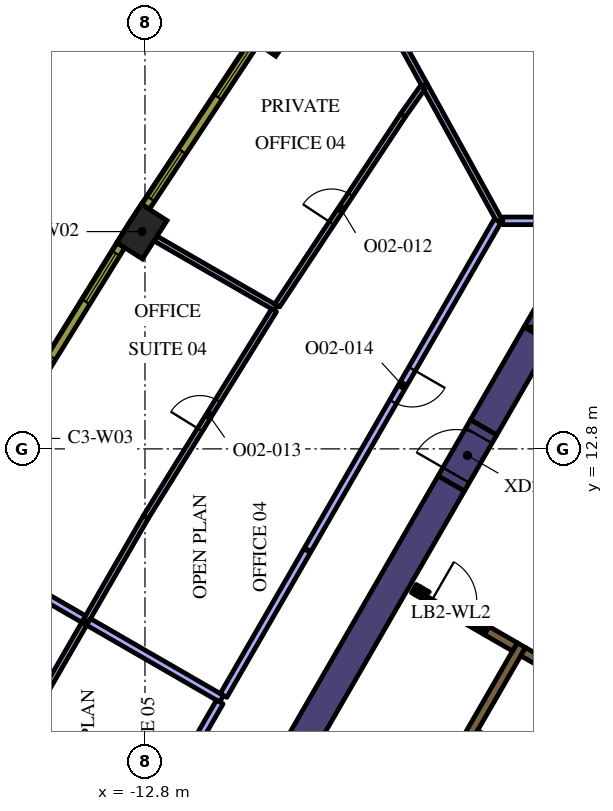
"""IFC4 building model, lengths in metres.
Left out: names, types, materials, properties, quantities, classifications, styles, units other than length and angle.
Written with IfcOpenShell. Run it as: python <this file> out.ifc"""

import sys

from ifc_helpers import new_model, si_unit, direction, frame, frame_2d, origin, origin_2d, place, context, subcontext, project, spatial, polyline, rectangle, outline, extrude, element, fill, save


model = new_model("IFC4")
c1 = context("Model", 3, precision=1e-05, world=origin(), true_north=direction((0.0, 1.0)))
c2 = subcontext(c1, "Body", "Model", "MODEL_VIEW")
j1 = project(units=[si_unit("LENGTHUNIT", "METRE"), si_unit("PLANEANGLEUNIT", "RADIAN")], contexts=[c1])
p1 = place(None, origin())
s1 = spatial("IfcSite", under=j1, at=p1, CompositionType="ELEMENT")
p2 = place(p1, origin())
s2 = spatial("IfcBuilding", under=s1, at=p2, CompositionType="ELEMENT")
p3 = place(p2, frame((0.0, 0.0, 154.2)))
s3 = spatial("IfcBuildingStorey", under=s2, at=p3, CompositionType="ELEMENT", Elevation=154.2)
for number, where, z_axis, x_axis in (
    (1, (-9.348, 23.854, 0.0), (0.0, 0.0, 1.0), (-0.565, -0.825, 0.0)),
    (2, (-12.88, 18.517, 0.0), (0.0, 0.0, 1.0), (-0.539, -0.842, 0.0)),
):
    element("IfcColumn", number, at=place(p3, frame(where, z_axis=z_axis, x_axis=x_axis)), inside=s3, PredefinedType="COLUMN", context=c2, shape_type="SweptSolid", body=[
        extrude(rectangle(XDim=1.2, YDim=0.8, at=origin_2d()), origin(), (0.0, 0.0, 1.0), 4.2),
    ])
p4 = place(p3, origin())
e3 = element("IfcWall", 3, at=p4, inside=s3, PredefinedType="SOLIDWALL", context=c2, shape_type="SweptSolid", body=[
    extrude(outline(polyline([(-2.829, 16.0), (-2.381, 16.776), (-2.381, 16.0), (-2.829, 16.0)])), origin(), (0.0, 0.0, 1.0), 4.2),
])
p5 = place(p3, frame((-2.477, 15.81, 0.0), z_axis=(0.0, 0.0, 1.0), x_axis=(-0.499969377405, -0.866043083026, 0.0)))
e4 = element("IfcWall", 4, at=p5, inside=s3, PredefinedType="SOLIDWALL", context=c2, shape_type="SweptSolid", body=[
    extrude(rectangle(XDim=2.824, YDim=0.8, at=frame_2d((1.412, 0.0))), origin(), (0.0, 0.0, 1.0), 4.2),
])
e5 = element("IfcWall", 5, at=p4, inside=s3, PredefinedType="SOLIDWALL", context=c2, shape_type="SweptSolid", body=[
    extrude(outline(polyline([(-1.905, 16.0), (-2.129, 15.612), (-2.801, 16.0), (-1.905, 16.0)])), origin(), (0.0, 0.0, 1.0), 4.2),
])
p6 = place(p3, frame((-12.668, -1.842, 0.0), z_axis=(0.0, 0.0, 1.0), x_axis=(0.500003640647, 0.866023301845, 0.0)))
e6 = element("IfcWall", 6, at=p6, inside=s3, PredefinedType="SOLIDWALL", context=c2, shape_type="SweptSolid", body=[
    extrude(rectangle(XDim=15.858, YDim=0.8, at=frame_2d((7.929, 0.0))), origin(), (0.0, 0.0, 1.0), 4.2),
])
p7 = place(p3, frame((-8.06, -1.311, 0.0), z_axis=(0.0, 0.0, 1.0), x_axis=(0.50000273126, 0.866023826885, 0.0)))
e7 = element("IfcWall", 7, at=p7, inside=s3, PredefinedType="SOLIDWALL", context=c2, shape_type="SweptSolid", body=[
    extrude(rectangle(XDim=10.33, YDim=0.25, at=frame_2d((5.165, 0.0))), origin(), (0.0, 0.0, 1.0), 4.2),
])
p8 = place(p3, frame((-1.76, 6.836, 0.0), z_axis=(0.0, 0.0, 1.0), x_axis=(-0.865952863304, 0.500125622755, 0.0)))
e8 = element("IfcWall", 8, at=p8, inside=s3, PredefinedType="SOLIDWALL", context=c2, shape_type="SweptSolid", body=[
    extrude(rectangle(XDim=1.258, YDim=0.25, at=frame_2d((0.629, 0.0))), origin(), (0.0, 0.0, 1.0), 4.2),
])
p9 = place(p3, frame((-2.204, 4.182, 0.0), z_axis=(0.0, 0.0, 1.0), x_axis=(-0.866008176907, 0.50002983664, 0.0)))
e9 = element("IfcWall", 9, at=p9, inside=s3, PredefinedType="SOLIDWALL", context=c2, shape_type="SweptSolid", body=[
    extrude(rectangle(XDim=2.2, YDim=0.25, at=frame_2d((1.1, 0.0))), origin(), (0.0, 0.0, 1.0), 4.2),
])
p10 = place(p3, frame((-5.725, 9.125, 0.0), z_axis=(0.0, 0.0, 1.0), x_axis=(0.866185586049, -0.49972245349, 0.0)))
e10 = element("IfcWall", 10, at=p10, inside=s3, PredefinedType="SOLIDWALL", context=c2, shape_type="SweptSolid", body=[
    extrude(rectangle(XDim=0.11, YDim=0.25, at=frame_2d((0.055, 0.0))), origin(), (0.0, 0.0, 1.0), 4.2),
])
p11 = place(p3, frame((-3.066, 7.59, 0.0), z_axis=(0.0, 0.0, 1.0), x_axis=(-0.866081358704, 0.49990307071, 0.0)))
e11 = element("IfcWall", 11, at=p11, inside=s3, PredefinedType="SOLIDWALL", context=c2, shape_type="SweptSolid", body=[
    extrude(rectangle(XDim=0.858, YDim=0.25, at=frame_2d((0.429, 0.0))), origin(), (0.0, 0.0, 1.0), 4.2),
])
e12 = element("IfcWall", 12, at=p4, inside=s3, PredefinedType="SOLIDWALL", context=c2, shape_type="SweptSolid", body=[
    extrude(outline(polyline([(-3.748, 8.128), (-3.813, 8.015), (-4.027, 8.139), (-4.017, 8.156), (-4.008, 8.173), (-4.0, 8.192), (-3.995, 8.21), (-3.991, 8.23), (-3.99, 8.25), (-3.99, 8.268), (-3.748, 8.128)])), origin(), (0.0, 0.0, 1.0), 4.2),
])
e13 = element("IfcWall", 13, at=p4, inside=s3, PredefinedType="SOLIDWALL", context=c2, shape_type="SweptSolid", body=[
    extrude(outline(polyline([(-5.689, 8.96), (-5.69, 8.961), (-5.565, 9.177), (-5.319, 9.035), (-5.335, 9.026), (-5.351, 9.015), (-5.366, 9.002), (-5.379, 8.988), (-5.392, 8.972), (-5.402, 8.956), (-5.412, 8.939), (-5.629, 9.064), (-5.629, 9.064), (-5.689, 8.96)])), origin(), (0.0, 0.0, 1.0), 4.2),
])
p12 = place(p3, frame((-0.898, 6.194, 0.0), z_axis=(0.0, 0.0, 1.0), x_axis=(-0.499996202215, -0.866027596426, 0.0)))
e14 = element("IfcWall", 14, at=p12, inside=s3, PredefinedType="SOLIDWALL", context=c2, shape_type="SweptSolid", body=[
    extrude(rectangle(XDim=9.83, YDim=0.25, at=frame_2d((4.915, 0.0))), origin(), (0.0, 0.0, 1.0), 4.2),
])
p13 = place(p12, frame((0.585, 0.0, 0.0)))
e15 = element("IfcOpeningElement", 15, at=p13, cuts=e14, PredefinedType="OPENING", context=c2, shape_type="SweptSolid", body=[
    extrude(rectangle(XDim=1.1, YDim=2.1, at=frame_2d((0.55, 1.05))), frame((0.0, 0.135, 0.0), z_axis=(0.0, -1.0, 0.0), x_axis=(1.0, 0.0, 0.0)), (0.0, 0.0, 1.0), 0.27),
])
p14 = place(p12, frame((3.105, 0.0, 0.0)))
e16 = element("IfcOpeningElement", 16, at=p14, cuts=e14, PredefinedType="OPENING", context=c2, shape_type="SweptSolid", body=[
    extrude(rectangle(XDim=1.1, YDim=2.1, at=frame_2d((0.55, 1.05))), frame((0.0, 0.135, 0.0), z_axis=(0.0, -1.0, 0.0), x_axis=(1.0, 0.0, 0.0)), (0.0, 0.0, 1.0), 0.27),
])
p15 = place(p12, frame((5.625, 0.0, 0.0)))
e17 = element("IfcOpeningElement", 17, at=p15, cuts=e14, PredefinedType="OPENING", context=c2, shape_type="SweptSolid", body=[
    extrude(rectangle(XDim=1.1, YDim=2.1, at=frame_2d((0.55, 1.05))), frame((0.0, 0.135, 0.0), z_axis=(0.0, -1.0, 0.0), x_axis=(1.0, 0.0, 0.0)), (0.0, 0.0, 1.0), 0.27),
])
p16 = place(p12, frame((8.145, 0.0, 0.0)))
e18 = element("IfcOpeningElement", 18, at=p16, cuts=e14, PredefinedType="OPENING", context=c2, shape_type="SweptSolid", body=[
    extrude(rectangle(XDim=1.1, YDim=2.1, at=frame_2d((0.55, 1.05))), frame((0.0, 0.135, 0.0), z_axis=(0.0, -1.0, 0.0), x_axis=(1.0, 0.0, 0.0)), (0.0, 0.0, 1.0), 0.27),
])
p17 = place(p3, frame((-5.659, 9.012, 0.0), z_axis=(0.0, 0.0, 1.0), x_axis=(0.866009402589, -0.500027713859, 0.0)))
e19 = element("IfcWall", 19, at=p17, inside=s3, PredefinedType="PARTITIONING", context=c2, shape_type="SweptSolid", body=[
    extrude(rectangle(XDim=2.1, YDim=0.12, at=frame_2d((1.05, 0.0))), origin(), (0.0, 0.0, 1.0), 3.15),
])
p18 = place(p17, frame((0.45, 0.0, 0.0)))
e20 = element("IfcOpeningElement", 20, at=p18, cuts=e19, PredefinedType="OPENING", context=c2, shape_type="SweptSolid", body=[
    extrude(rectangle(XDim=1.2, YDim=2.1, at=frame_2d((0.6, 1.05))), frame((0.0, 0.07, 0.0), z_axis=(0.0, -1.0, 0.0), x_axis=(1.0, 0.0, 0.0)), (0.0, 0.0, 1.0), 0.14),
])
p19 = place(p3, frame((-4.739, 11.892, 0.0), z_axis=(0.0, 0.0, 1.0), x_axis=(0.500062241894, 0.865989465428, 0.0)))
e21 = element("IfcWall", 21, at=p19, inside=s3, PredefinedType="SOLIDWALL", context=c2, shape_type="SweptSolid", body=[
    extrude(rectangle(XDim=1.7, YDim=0.8, at=frame_2d((0.85, 0.0))), origin(), (0.0, 0.0, 1.0), 4.2),
])
p20 = place(p19, frame((0.25, 0.0, 0.0)))
e22 = element("IfcOpeningElement", 22, at=p20, cuts=e21, PredefinedType="OPENING", context=c2, shape_type="SweptSolid", body=[
    extrude(rectangle(XDim=1.2, YDim=2.1, at=frame_2d((0.6, 1.05))), frame((0.0, 0.41, 0.0), z_axis=(0.0, -1.0, 0.0), x_axis=(1.0, 0.0, 0.0)), (0.0, 0.0, 1.0), 0.82),
])
p21 = place(p3, frame((-5.442, 22.374, 0.0), z_axis=(0.0, 0.0, 1.0), x_axis=(-0.482987550425, 0.875627218703, 0.0)))
e23 = element("IfcWall", 23, at=p21, inside=s3, PredefinedType="PARTITIONING", context=c2, shape_type="SweptSolid", body=[
    extrude(rectangle(XDim=4.672, YDim=0.15, at=frame_2d((2.336, 0.0))), origin(), (0.0, 0.0, 1.0), 3.15),
])
p22 = place(p3, frame((-3.47, 18.8, 0.0), z_axis=(0.0, 0.0, 1.0), x_axis=(-0.482974768035, 0.875634269225, 0.0)))
e24 = element("IfcWall", 24, at=p22, inside=s3, PredefinedType="PARTITIONING", context=c2, shape_type="SweptSolid", body=[
    extrude(rectangle(XDim=4.09, YDim=0.15, at=frame_2d((2.045, 0.0))), origin(), (0.0, 0.0, 1.0), 3.15),
])
p23 = place(p3, frame((-1.23, 18.8, 0.0), z_axis=(0.0, 0.0, 1.0), x_axis=(-1.0, 0.0, 0.0)))
e25 = element("IfcWall", 25, at=p23, inside=s3, PredefinedType="PARTITIONING", context=c2, shape_type="SweptSolid", body=[
    extrude(rectangle(XDim=2.155, YDim=0.2, at=frame_2d((1.077, 0.0))), origin(), (0.0, 0.0, 1.0), 3.15),
])
p24 = place(p3, frame((-9.363, 16.511, 0.0), z_axis=(0.0, 0.0, 1.0), x_axis=(-0.866006134298, 0.500033374244, 0.0)))
e26 = element("IfcWall", 26, at=p24, inside=s3, PredefinedType="PARTITIONING", context=c2, shape_type="SweptSolid", body=[
    extrude(rectangle(XDim=3.648, YDim=0.15, at=frame_2d((1.824, 0.0))), origin(), (0.0, 0.0, 1.0), 3.15),
])
p25 = place(p3, frame((-5.492, 22.31, 0.0), z_axis=(0.0, 0.0, 1.0), x_axis=(-0.576980663571, -0.816757806124, 0.0)))
e27 = element("IfcWall", 27, at=p25, inside=s3, PredefinedType="PARTITIONING", context=c2, shape_type="SweptSolid", body=[
    extrude(rectangle(XDim=0.902, YDim=0.15, at=frame_2d((0.451, 0.0))), origin(), (0.0, 0.0, 1.0), 3.15),
])
p26 = place(p3, frame((-9.322, 16.573, 0.0), z_axis=(0.0, 0.0, 1.0), x_axis=(0.551906048292, 0.833906298009, 0.0)))
e28 = element("IfcWall", 28, at=p26, inside=s3, PredefinedType="PARTITIONING", context=c2, shape_type="SweptSolid", body=[
    extrude(rectangle(XDim=5.995, YDim=0.15, at=frame_2d((2.998, 0.0))), origin(), (0.0, 0.0, 1.0), 3.15),
])
p27 = place(p26, frame((2.595, 0.0, 0.0)))
e29 = element("IfcOpeningElement", 29, at=p27, cuts=e28, PredefinedType="OPENING", context=c2, shape_type="SweptSolid", body=[
    extrude(rectangle(XDim=0.9, YDim=2.1, at=frame_2d((0.45, 1.05))), frame((0.0, 0.085, 0.0), z_axis=(0.0, -1.0, 0.0), x_axis=(1.0, 0.0, 0.0)), (0.0, 0.0, 1.0), 0.17),
])
p28 = place(p3, frame((-12.779, 11.002, 0.0), z_axis=(0.0, 0.0, 1.0), x_axis=(0.527026092571, 0.849849102929, 0.0)))
e30 = element("IfcWall", 30, at=p28, inside=s3, PredefinedType="PARTITIONING", context=c2, shape_type="SweptSolid", body=[
    extrude(rectangle(XDim=6.407, YDim=0.15, at=frame_2d((3.204, 0.0))), origin(), (0.0, 0.0, 1.0), 3.15),
])
p29 = place(p28, frame((2.707, 0.0, 0.0)))
e31 = element("IfcOpeningElement", 31, at=p29, cuts=e30, PredefinedType="OPENING", context=c2, shape_type="SweptSolid", body=[
    extrude(rectangle(XDim=0.9, YDim=2.1, at=frame_2d((0.45, 1.05))), frame((0.0, 0.085, 0.0), z_axis=(0.0, -1.0, 0.0), x_axis=(1.0, 0.0, 0.0)), (0.0, 0.0, 1.0), 0.17),
])
p30 = place(p3, frame((-12.779, 11.002, 0.0), z_axis=(0.0, 0.0, 1.0), x_axis=(-0.499996312652, -0.866027532665, 0.0)))
e32 = element("IfcWall", 32, at=p30, inside=s3, PredefinedType="PARTITIONING", context=c2, shape_type="SweptSolid", body=[
    extrude(rectangle(XDim=3.138, YDim=0.15, at=frame_2d((1.569, 0.0))), origin(), (0.0, 0.0, 1.0), 3.15),
])
p31 = place(p3, frame((-14.413, 8.322, 0.0), z_axis=(0.0, 0.0, 1.0), x_axis=(-0.866034795751, 0.499983732284, 0.0)))
e33 = element("IfcWall", 33, at=p31, inside=s3, PredefinedType="PARTITIONING", context=c2, shape_type="SweptSolid", body=[
    extrude(rectangle(XDim=4.125, YDim=0.2, at=frame_2d((2.062, 0.0))), origin(), (0.0, 0.0, 1.0), 3.15),
])
p32 = place(p3, frame((-10.782, 6.225, 0.0), z_axis=(0.0, 0.0, 1.0), x_axis=(-0.866034752867, 0.499983806564, 0.0)))
e34 = element("IfcWall", 34, at=p32, inside=s3, PredefinedType="PARTITIONING", context=c2, shape_type="SweptSolid", body=[
    extrude(rectangle(XDim=4.043, YDim=0.2, at=frame_2d((2.021, 0.0))), origin(), (0.0, 0.0, 1.0), 3.15),
])
p33 = place(p3, frame((-8.532, 10.122, 0.0), z_axis=(0.0, 0.0, 1.0), x_axis=(-0.499988222896, -0.866032203192, 0.0)))
e35 = element("IfcWall", 35, at=p33, inside=s3, PredefinedType="PARTITIONING", context=c2, shape_type="SweptSolid", body=[
    extrude(rectangle(XDim=4.4, YDim=0.2, at=frame_2d((2.2, 0.0))), origin(), (0.0, 0.0, 1.0), 3.15),
])
p34 = place(p3, frame((-3.522, 18.8, 0.0), z_axis=(0.0, 0.0, 1.0), x_axis=(-0.500015783377, -0.866016291056, 0.0)))
e36 = element("IfcWall", 36, at=p34, inside=s3, PredefinedType="PARTITIONING", context=c2, shape_type="SweptSolid", body=[
    extrude(rectangle(XDim=9.99, YDim=0.2, at=frame_2d((4.995, 0.0))), origin(), (0.0, 0.0, 1.0), 3.15),
])
p35 = place(p34, frame((4.5, 0.0, 0.0)))
e37 = element("IfcOpeningElement", 37, at=p35, cuts=e36, PredefinedType="OPENING", context=c2, shape_type="SweptSolid", body=[
    extrude(rectangle(XDim=1.0, YDim=2.1, at=frame_2d((0.5, 1.05))), frame((0.0, 0.11, 0.0), z_axis=(0.0, -1.0, 0.0), x_axis=(1.0, 0.0, 0.0)), (0.0, 0.0, 1.0), 0.22),
])
p36 = place(p3, frame((-14.398, 8.198, 0.0), z_axis=(0.0, 0.0, 1.0), x_axis=(-0.499993740961, -0.866029017412, 0.0)))
e38 = element("IfcWall", 38, at=p36, inside=s3, PredefinedType="PARTITIONING", context=c2, shape_type="SweptSolid", body=[
    extrude(rectangle(XDim=3.038, YDim=0.15, at=frame_2d((1.519, 0.0))), origin(), (0.0, 0.0, 1.0), 3.15),
])
p37 = place(p3, frame((-10.832, 6.138, 0.0), z_axis=(0.0, 0.0, 1.0), x_axis=(-0.499988222896, -0.866032203192, 0.0)))
e39 = element("IfcWall", 39, at=p37, inside=s3, PredefinedType="PARTITIONING", context=c2, shape_type="SweptSolid", body=[
    extrude(rectangle(XDim=4.4, YDim=0.2, at=frame_2d((2.2, 0.0))), origin(), (0.0, 0.0, 1.0), 3.15),
])
p38 = place(p3, frame((-9.911, 23.51, 0.0), z_axis=(0.0, 0.0, 1.0), x_axis=(-0.551892811511, -0.833915058386, 0.0)))
e40 = element("IfcWall", 40, at=p38, inside=s3, PredefinedType="SOLIDWALL", context=c2, shape_type="SweptSolid", body=[
    extrude(rectangle(XDim=5.204, YDim=0.24, at=frame_2d((2.602, 0.0))), origin(), (0.0, 0.0, 1.0), 3.95),
])
p39 = place(p38, frame((0.248, 0.0, 0.9)))
e41 = element("IfcOpeningElement", 41, at=p39, cuts=e40, PredefinedType="OPENING", context=c2, shape_type="SweptSolid", body=[
    extrude(rectangle(XDim=1.5, YDim=2.55, at=frame_2d((0.75, 1.275))), frame((0.0, 0.13, 0.0), z_axis=(0.0, -1.0, 0.0), x_axis=(1.0, 0.0, 0.0)), (0.0, 0.0, 1.0), 0.26),
])
p40 = place(p38, frame((3.455, 0.0, 0.9)))
e42 = element("IfcOpeningElement", 42, at=p40, cuts=e40, PredefinedType="OPENING", context=c2, shape_type="SweptSolid", body=[
    extrude(rectangle(XDim=1.5, YDim=2.55, at=frame_2d((0.75, 1.275))), frame((0.0, 0.13, 0.0), z_axis=(0.0, -1.0, 0.0), x_axis=(1.0, 0.0, 0.0)), (0.0, 0.0, 1.0), 0.26),
])
p41 = place(p3, frame((-13.433, 18.156, 0.0), z_axis=(0.0, 0.0, 1.0), x_axis=(-0.526197926587, -0.850362124072, 0.0)))
e43 = element("IfcWall", 43, at=p41, inside=s3, PredefinedType="SOLIDWALL", context=c2, shape_type="SweptSolid", body=[
    extrude(rectangle(XDim=5.203, YDim=0.24, at=frame_2d((2.602, 0.0))), origin(), (0.0, 0.0, 1.0), 3.95),
])
p42 = place(p41, frame((0.248, 0.0, 0.9)))
e44 = element("IfcOpeningElement", 44, at=p42, cuts=e43, PredefinedType="OPENING", context=c2, shape_type="SweptSolid", body=[
    extrude(rectangle(XDim=1.5, YDim=2.55, at=frame_2d((0.75, 1.275))), frame((0.0, 0.13, 0.0), z_axis=(0.0, -1.0, 0.0), x_axis=(1.0, 0.0, 0.0)), (0.0, 0.0, 1.0), 0.26),
])
p43 = place(p41, frame((3.455, 0.0, 0.9)))
e45 = element("IfcOpeningElement", 45, at=p43, cuts=e43, PredefinedType="OPENING", context=c2, shape_type="SweptSolid", body=[
    extrude(rectangle(XDim=1.5, YDim=2.55, at=frame_2d((0.75, 1.275))), frame((0.0, 0.13, 0.0), z_axis=(0.0, -1.0, 0.0), x_axis=(1.0, 0.0, 0.0)), (0.0, 0.0, 1.0), 0.26),
])
p44 = place(p18, origin())
e46 = element("IfcDoor", 46, at=p44, inside=s3, OperationType="SINGLE_SWING_LEFT", PredefinedType="DOOR", context=c2, shape_type="SweptSolid", body=[
    extrude(rectangle(XDim=1.2, YDim=2.1, at=frame_2d((0.6, 1.05))), frame((0.0, 0.025, 0.0), z_axis=(0.0, -1.0, 0.0), x_axis=(1.0, 0.0, 0.0)), (0.0, 0.0, 1.0), 0.05),
])
fill(e20, e46)
p45 = place(p20, origin())
e47 = element("IfcDoor", 47, at=p45, inside=s3, OperationType="SINGLE_SWING_LEFT", PredefinedType="DOOR", context=c2, shape_type="SweptSolid", body=[
    extrude(rectangle(XDim=1.2, YDim=2.1, at=frame_2d((0.6, 1.05))), frame((0.0, 0.025, 0.0), z_axis=(0.0, -1.0, 0.0), x_axis=(1.0, 0.0, 0.0)), (0.0, 0.0, 1.0), 0.05),
])
fill(e22, e47)
p46 = place(p27, origin())
e48 = element("IfcDoor", 48, at=p46, inside=s3, OperationType="SINGLE_SWING_RIGHT", PredefinedType="DOOR", context=c2, shape_type="SweptSolid", body=[
    extrude(rectangle(XDim=0.9, YDim=2.1, at=frame_2d((0.45, 1.05))), frame((0.0, 0.025, 0.0), z_axis=(0.0, -1.0, 0.0), x_axis=(1.0, 0.0, 0.0)), (0.0, 0.0, 1.0), 0.05),
])
fill(e29, e48)
p47 = place(p29, origin())
e49 = element("IfcDoor", 49, at=p47, inside=s3, OperationType="SINGLE_SWING_LEFT", PredefinedType="DOOR", context=c2, shape_type="SweptSolid", body=[
    extrude(rectangle(XDim=0.9, YDim=2.1, at=frame_2d((0.45, 1.05))), frame((0.0, 0.025, 0.0), z_axis=(0.0, -1.0, 0.0), x_axis=(1.0, 0.0, 0.0)), (0.0, 0.0, 1.0), 0.05),
])
fill(e31, e49)
p48 = place(p35, origin())
e50 = element("IfcDoor", 50, at=p48, inside=s3, OperationType="SINGLE_SWING_RIGHT", PredefinedType="DOOR", context=c2, shape_type="SweptSolid", body=[
    extrude(rectangle(XDim=1.0, YDim=2.1, at=frame_2d((0.5, 1.05))), frame((0.0, 0.025, 0.0), z_axis=(0.0, -1.0, 0.0), x_axis=(1.0, 0.0, 0.0)), (0.0, 0.0, 1.0), 0.05),
])
fill(e37, e50)
p49 = place(p39, origin())
e51 = element("IfcWindow", 51, at=p49, inside=s3, PartitioningType="SINGLE_PANEL", PredefinedType="WINDOW", context=c2, shape_type="SweptSolid", body=[
    extrude(rectangle(XDim=1.5, YDim=2.55, at=frame_2d((0.75, 1.275))), frame((0.0, 0.04, 0.0), z_axis=(0.0, -1.0, 0.0), x_axis=(1.0, 0.0, 0.0)), (0.0, 0.0, 1.0), 0.06),
])
fill(e41, e51)
p50 = place(p40, origin())
e52 = element("IfcWindow", 52, at=p50, inside=s3, PartitioningType="SINGLE_PANEL", PredefinedType="WINDOW", context=c2, shape_type="SweptSolid", body=[
    extrude(rectangle(XDim=1.5, YDim=2.55, at=frame_2d((0.75, 1.275))), frame((0.0, 0.04, 0.0), z_axis=(0.0, -1.0, 0.0), x_axis=(1.0, 0.0, 0.0)), (0.0, 0.0, 1.0), 0.06),
])
fill(e42, e52)
p51 = place(p42, origin())
e53 = element("IfcWindow", 53, at=p51, inside=s3, PartitioningType="SINGLE_PANEL", PredefinedType="WINDOW", context=c2, shape_type="SweptSolid", body=[
    extrude(rectangle(XDim=1.5, YDim=2.55, at=frame_2d((0.75, 1.275))), frame((0.0, 0.04, 0.0), z_axis=(0.0, -1.0, 0.0), x_axis=(1.0, 0.0, 0.0)), (0.0, 0.0, 1.0), 0.06),
])
fill(e44, e53)
p52 = place(p43, origin())
e54 = element("IfcWindow", 54, at=p52, inside=s3, PartitioningType="SINGLE_PANEL", PredefinedType="WINDOW", context=c2, shape_type="SweptSolid", body=[
    extrude(rectangle(XDim=1.5, YDim=2.55, at=frame_2d((0.75, 1.275))), frame((0.0, 0.04, 0.0), z_axis=(0.0, -1.0, 0.0), x_axis=(1.0, 0.0, 0.0)), (0.0, 0.0, 1.0), 0.06),
])
fill(e45, e54)
save(model, sys.argv[1])
